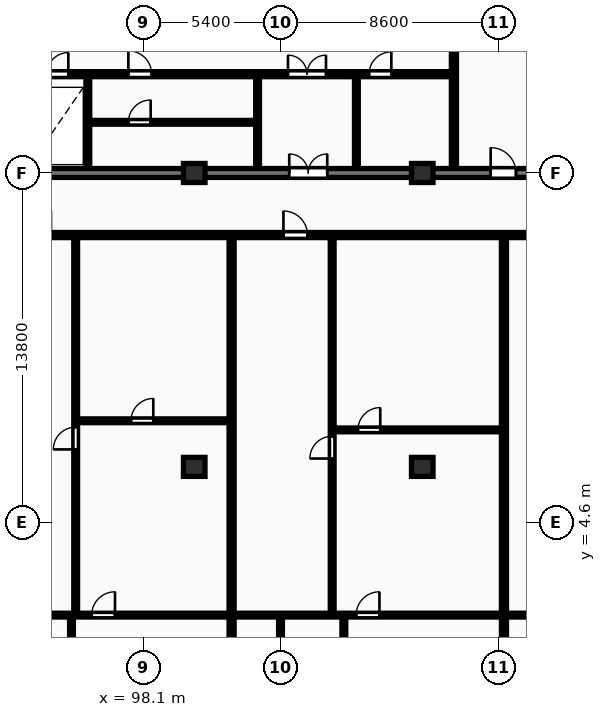
"""IFC4 building model, lengths in metres.
Left out: names, types, materials, properties, quantities, classifications, styles, units other than length and angle.
Written with IfcOpenShell. Run it as: python <this file> out.ifc"""

import sys

from ifc_helpers import new_model, si_unit, direction, frame, frame_2d, origin, origin_2d, place, context, subcontext, project, spatial, rectangle, extrude, element, fill, save


model = new_model("IFC4")
c1 = context("Model", 3, precision=1e-05, world=origin(), true_north=direction((0.0, 1.0)))
c2 = subcontext(c1, "Body", "Model", "MODEL_VIEW")
j1 = project(units=[si_unit("LENGTHUNIT", "METRE"), si_unit("PLANEANGLEUNIT", "RADIAN")], contexts=[c1])
p1 = place(None, origin())
s1 = spatial("IfcSite", under=j1, at=p1, CompositionType="ELEMENT")
p2 = place(p1, origin())
s2 = spatial("IfcBuilding", under=s1, at=p2, CompositionType="ELEMENT")
p3 = place(p2, frame((0.0, 0.0, 100.3)))
s3 = spatial("IfcBuildingStorey", under=s2, at=p3, CompositionType="ELEMENT", Elevation=100.3)
for number, where, z_axis, x_axis in (
    (1, (100.1, 6.8, 0.0), (0.0, 0.0, 1.0), (1.0, 0.0, 0.0)),
    (2, (100.1, 18.4, 0.0), (0.0, 0.0, 1.0), (1.0, 0.0, 0.0)),
    (3, (109.1, 6.8, 0.0), (0.0, 0.0, 1.0), (1.0, 0.0, 0.0)),
    (4, (109.1, 18.4, 0.0), (0.0, 0.0, 1.0), (1.0, 0.0, 0.0)),
):
    element("IfcColumn", number, at=place(p3, frame(where, z_axis=z_axis, x_axis=x_axis)), inside=s3, PredefinedType="COLUMN", context=c2, shape_type="SweptSolid", body=[
        extrude(rectangle(XDim=0.85, YDim=0.75, at=origin_2d()), origin(), (0.0, 0.0, 1.0), 3.25),
    ])
p4 = place(p3, frame((81.925, 18.4, 0.0), z_axis=(0.0, 0.0, 1.0), x_axis=(1.0, 0.0, 0.0)))
e5 = element("IfcWall", 5, at=p4, inside=s3, PredefinedType="SHEAR", context=c2, shape_type="SweptSolid", body=[
    extrude(rectangle(XDim=36.265, YDim=0.35, at=frame_2d((18.132, 0.0))), origin(), (0.0, 0.0, 1.0), 3.25),
])
p5 = place(p4, frame((5.675, 0.0, 0.0)))
e6 = element("IfcOpeningElement", 6, at=p5, cuts=e5, PredefinedType="OPENING", context=c2, shape_type="SweptSolid", body=[
    extrude(rectangle(XDim=1.0, YDim=2.15, at=frame_2d((0.5, 1.075))), frame((0.0, 0.185, 0.0), z_axis=(0.0, -1.0, 0.0), x_axis=(1.0, 0.0, 0.0)), (0.0, 0.0, 1.0), 0.37),
])
p6 = place(p4, frame((21.925, 0.0, 0.0)))
e7 = element("IfcOpeningElement", 7, at=p6, cuts=e5, PredefinedType="OPENING", context=c2, shape_type="SweptSolid", body=[
    extrude(rectangle(XDim=1.5, YDim=2.2, at=frame_2d((0.75, 1.1))), frame((0.0, 0.185, 0.0), z_axis=(0.0, -1.0, 0.0), x_axis=(1.0, 0.0, 0.0)), (0.0, 0.0, 1.0), 0.37),
])
p7 = place(p4, frame((29.875, 0.0, 0.0)))
e8 = element("IfcOpeningElement", 8, at=p7, cuts=e5, PredefinedType="OPENING", context=c2, shape_type="SweptSolid", body=[
    extrude(rectangle(XDim=1.0, YDim=2.15, at=frame_2d((0.5, 1.075))), frame((0.0, 0.185, 0.0), z_axis=(0.0, -1.0, 0.0), x_axis=(1.0, 0.0, 0.0)), (0.0, 0.0, 1.0), 0.37),
])
p8 = place(p3, frame((95.9, 18.6, 0.0), z_axis=(0.0, 0.0, 1.0), x_axis=(0.0, 1.0, 0.0)))
e9 = element("IfcWall", 9, at=p8, inside=s3, PredefinedType="PARTITIONING", context=c2, shape_type="SweptSolid", body=[
    extrude(rectangle(XDim=3.6, YDim=0.15, at=frame_2d((1.8, 0.0))), origin(), (0.0, 0.0, 1.0), 2.97),
])
p9 = place(p3, frame((95.9, 20.4, 0.0), z_axis=(0.0, 0.0, 1.0), x_axis=(1.0, 0.0, 0.0)))
e10 = element("IfcWall", 10, at=p9, inside=s3, PredefinedType="PARTITIONING", context=c2, shape_type="SweptSolid", body=[
    extrude(rectangle(XDim=6.7, YDim=0.15, at=frame_2d((3.35, 0.0))), origin(), (0.0, 0.0, 1.0), 2.97),
])
p10 = place(p9, frame((1.6, 0.0, 0.0)))
e11 = element("IfcOpeningElement", 11, at=p10, cuts=e10, PredefinedType="OPENING", context=c2, shape_type="SweptSolid", body=[
    extrude(rectangle(XDim=0.88, YDim=2.06, at=frame_2d((0.44, 1.03))), frame((0.0, 0.085, 0.0), z_axis=(0.0, -1.0, 0.0), x_axis=(1.0, 0.0, 0.0)), (0.0, 0.0, 1.0), 0.17),
])
for number, where, z_axis, x_axis in (
    (12, (102.6, 18.6, 0.0), (0.0, 0.0, 1.0), (0.0, 1.0, 0.0)),
    (13, (106.5, 18.6, 0.0), (0.0, 0.0, 1.0), (0.0, 1.0, 0.0)),
):
    element("IfcWall", number, at=place(p3, frame(where, z_axis=z_axis, x_axis=x_axis)), inside=s3, PredefinedType="PARTITIONING", context=c2, shape_type="SweptSolid", body=[
        extrude(rectangle(XDim=3.6, YDim=0.15, at=frame_2d((1.8, 0.0))), origin(), (0.0, 0.0, 1.0), 2.97),
    ])
p11 = place(p3, frame((91.08, 22.3, 0.0), z_axis=(0.0, 0.0, 1.0), x_axis=(1.0, 0.0, 0.0)))
e14 = element("IfcWall", 14, at=p11, inside=s3, PredefinedType="PARTITIONING", context=c2, shape_type="SweptSolid", body=[
    extrude(rectangle(XDim=19.14, YDim=0.2, at=frame_2d((9.57, 0.0))), origin(), (0.0, 0.0, 1.0), 2.97),
])
p12 = place(p11, frame((1.15, 0.0, 0.0)))
e15 = element("IfcOpeningElement", 15, at=p12, cuts=e14, PredefinedType="OPENING", context=c2, shape_type="SweptSolid", body=[
    extrude(rectangle(XDim=0.85, YDim=2.05, at=frame_2d((0.425, 1.025))), frame((0.0, 0.11, 0.0), z_axis=(0.0, -1.0, 0.0), x_axis=(1.0, 0.0, 0.0)), (0.0, 0.0, 1.0), 0.22),
])
p13 = place(p11, frame((3.2, 0.0, 0.0)))
e16 = element("IfcOpeningElement", 16, at=p13, cuts=e14, PredefinedType="OPENING", context=c2, shape_type="SweptSolid", body=[
    extrude(rectangle(XDim=0.85, YDim=2.05, at=frame_2d((0.425, 1.025))), frame((0.0, 0.11, 0.0), z_axis=(0.0, -1.0, 0.0), x_axis=(1.0, 0.0, 0.0)), (0.0, 0.0, 1.0), 0.22),
])
p14 = place(p11, frame((12.72, 0.0, 0.0)))
e17 = element("IfcOpeningElement", 17, at=p14, cuts=e14, PredefinedType="OPENING", context=c2, shape_type="SweptSolid", body=[
    extrude(rectangle(XDim=1.5, YDim=2.2, at=frame_2d((0.75, 1.1))), frame((0.0, 0.11, 0.0), z_axis=(0.0, -1.0, 0.0), x_axis=(1.0, 0.0, 0.0)), (0.0, 0.0, 1.0), 0.22),
])
p15 = place(p11, frame((6.42, 0.0, 0.0)))
e18 = element("IfcOpeningElement", 18, at=p15, cuts=e14, PredefinedType="OPENING", context=c2, shape_type="SweptSolid", body=[
    extrude(rectangle(XDim=0.92, YDim=2.08, at=frame_2d((0.46, 1.04))), frame((0.0, 0.11, 0.0), z_axis=(0.0, -1.0, 0.0), x_axis=(1.0, 0.0, 0.0)), (0.0, 0.0, 1.0), 0.22),
])
p16 = place(p11, frame((15.92, 0.0, 0.0)))
e19 = element("IfcOpeningElement", 19, at=p16, cuts=e14, PredefinedType="OPENING", context=c2, shape_type="SweptSolid", body=[
    extrude(rectangle(XDim=0.88, YDim=2.06, at=frame_2d((0.44, 1.03))), frame((0.0, 0.11, 0.0), z_axis=(0.0, -1.0, 0.0), x_axis=(1.0, 0.0, 0.0)), (0.0, 0.0, 1.0), 0.22),
])
p17 = place(p3, frame((110.35, 18.6, 0.0), z_axis=(0.0, 0.0, 1.0), x_axis=(0.0, 1.0, 0.0)))
e20 = element("IfcWall", 20, at=p17, inside=s3, PredefinedType="PARTITIONING", context=c2, shape_type="SweptSolid", body=[
    extrude(rectangle(XDim=11.6, YDim=0.2, at=frame_2d((5.8, 0.0))), origin(), (0.0, 0.0, 1.0), 2.97),
])
p18 = place(p17, frame((5.2, 0.0, 0.0)))
e21 = element("IfcOpeningElement", 21, at=p18, cuts=e20, PredefinedType="OPENING", context=c2, shape_type="SweptSolid", body=[
    extrude(rectangle(XDim=1.1, YDim=2.15, at=frame_2d((0.55, 1.075))), frame((0.0, 0.11, 0.0), z_axis=(0.0, -1.0, 0.0), x_axis=(1.0, 0.0, 0.0)), (0.0, 0.0, 1.0), 0.22),
])
p19 = place(p3, frame((101.575, -8.7, 0.0), z_axis=(0.0, 0.0, 1.0), x_axis=(0.0, 1.0, 0.0)))
e22 = element("IfcWall", 22, at=p19, inside=s3, PredefinedType="PARTITIONING", context=c2, shape_type="SweptSolid", body=[
    extrude(rectangle(XDim=24.57, YDim=0.2, at=frame_2d((12.285, 0.0))), origin(), (0.0, 0.0, 1.0), 2.97),
])
p20 = place(p3, frame((95.48, 8.62, 0.0), z_axis=(0.0, 0.0, 1.0), x_axis=(1.0, 0.0, 0.0)))
e23 = element("IfcWall", 23, at=p20, inside=s3, PredefinedType="PARTITIONING", context=c2, shape_type="SweptSolid", body=[
    extrude(rectangle(XDim=6.015, YDim=0.15, at=frame_2d((3.008, 0.0))), origin(), (0.0, 0.0, 1.0), 2.97),
])
p21 = place(p20, frame((2.124, 0.0, 0.0)))
e24 = element("IfcOpeningElement", 24, at=p21, cuts=e23, PredefinedType="OPENING", context=c2, shape_type="SweptSolid", body=[
    extrude(rectangle(XDim=0.88, YDim=2.06, at=frame_2d((0.44, 1.03))), frame((0.0, 0.085, 0.0), z_axis=(0.0, -1.0, 0.0), x_axis=(1.0, 0.0, 0.0)), (0.0, 0.0, 1.0), 0.17),
])
p22 = place(p3, frame((95.42, 0.99, 0.0), z_axis=(0.0, 0.0, 1.0), x_axis=(0.0, 1.0, 0.0)))
e25 = element("IfcWall", 25, at=p22, inside=s3, PredefinedType="PARTITIONING", context=c2, shape_type="SweptSolid", body=[
    extrude(rectangle(XDim=14.9, YDim=0.15, at=frame_2d((7.45, 0.0))), origin(), (0.0, 0.0, 1.0), 2.97),
])
p23 = place(p22, frame((6.5, 0.0, 0.0)))
e26 = element("IfcOpeningElement", 26, at=p23, cuts=e25, PredefinedType="OPENING", context=c2, shape_type="SweptSolid", body=[
    extrude(rectangle(XDim=0.88, YDim=2.06, at=frame_2d((0.44, 1.03))), frame((0.0, 0.085, 0.0), z_axis=(0.0, -1.0, 0.0), x_axis=(1.0, 0.0, 0.0)), (0.0, 0.0, 1.0), 0.17),
])
p24 = place(p3, frame((95.255, -4.09, 0.0), z_axis=(0.0, 0.0, 1.0), x_axis=(0.0, 1.0, 0.0)))
e27 = element("IfcWall", 27, at=p24, inside=s3, PredefinedType="PARTITIONING", context=c2, shape_type="SweptSolid", body=[
    extrude(rectangle(XDim=5.0, YDim=0.15, at=frame_2d((2.5, 0.0))), origin(), (0.0, 0.0, 1.0), 2.97),
])
p25 = place(p24, frame((2.08, 0.0, 0.0)))
e28 = element("IfcOpeningElement", 28, at=p25, cuts=e27, PredefinedType="OPENING", context=c2, shape_type="SweptSolid", body=[
    extrude(rectangle(XDim=0.84, YDim=2.04, at=frame_2d((0.42, 1.02))), frame((0.0, 0.085, 0.0), z_axis=(0.0, -1.0, 0.0), x_axis=(1.0, 0.0, 0.0)), (0.0, 0.0, 1.0), 0.17),
])
p26 = place(p3, frame((91.53, 0.95, 0.0), z_axis=(0.0, 0.0, 1.0), x_axis=(1.0, 0.0, 0.0)))
e29 = element("IfcWall", 29, at=p26, inside=s3, PredefinedType="PARTITIONING", context=c2, shape_type="SweptSolid", body=[
    extrude(rectangle(XDim=9.965, YDim=0.15, at=frame_2d((4.982, 0.0))), origin(), (0.0, 0.0, 1.0), 2.97),
])
p27 = place(p26, frame((4.522, 0.0, 0.0)))
e30 = element("IfcOpeningElement", 30, at=p27, cuts=e29, PredefinedType="OPENING", context=c2, shape_type="SweptSolid", body=[
    extrude(rectangle(XDim=0.92, YDim=2.08, at=frame_2d((0.46, 1.04))), frame((0.0, 0.085, 0.0), z_axis=(0.0, -1.0, 0.0), x_axis=(1.0, 0.0, 0.0)), (0.0, 0.0, 1.0), 0.17),
])
p28 = place(p3, frame((112.325, -8.7, 0.0), z_axis=(0.0, 0.0, 1.0), x_axis=(0.0, 1.0, 0.0)))
e31 = element("IfcWall", 31, at=p28, inside=s3, PredefinedType="PARTITIONING", context=c2, shape_type="SweptSolid", body=[
    extrude(rectangle(XDim=24.57, YDim=0.2, at=frame_2d((12.285, 0.0))), origin(), (0.0, 0.0, 1.0), 2.97),
])
p29 = place(p3, frame((105.605, 8.26, 0.0), z_axis=(0.0, 0.0, 1.0), x_axis=(1.0, 0.0, 0.0)))
e32 = element("IfcWall", 32, at=p29, inside=s3, PredefinedType="PARTITIONING", context=c2, shape_type="SweptSolid", body=[
    extrude(rectangle(XDim=6.64, YDim=0.15, at=frame_2d((3.32, 0.0))), origin(), (0.0, 0.0, 1.0), 2.97),
])
p30 = place(p29, frame((0.957, 0.0, 0.0)))
e33 = element("IfcOpeningElement", 33, at=p30, cuts=e32, PredefinedType="OPENING", context=c2, shape_type="SweptSolid", body=[
    extrude(rectangle(XDim=0.88, YDim=2.06, at=frame_2d((0.44, 1.03))), frame((0.0, 0.085, 0.0), z_axis=(0.0, -1.0, 0.0), x_axis=(1.0, 0.0, 0.0)), (0.0, 0.0, 1.0), 0.17),
])
p31 = place(p3, frame((105.545, 0.99, 0.0), z_axis=(0.0, 0.0, 1.0), x_axis=(0.0, 1.0, 0.0)))
e34 = element("IfcWall", 34, at=p31, inside=s3, PredefinedType="PARTITIONING", context=c2, shape_type="SweptSolid", body=[
    extrude(rectangle(XDim=14.9, YDim=0.15, at=frame_2d((7.45, 0.0))), origin(), (0.0, 0.0, 1.0), 2.97),
])
p32 = place(p31, frame((6.14, 0.0, 0.0)))
e35 = element("IfcOpeningElement", 35, at=p32, cuts=e34, PredefinedType="OPENING", context=c2, shape_type="SweptSolid", body=[
    extrude(rectangle(XDim=0.88, YDim=2.06, at=frame_2d((0.44, 1.03))), frame((0.0, 0.085, 0.0), z_axis=(0.0, -1.0, 0.0), x_axis=(1.0, 0.0, 0.0)), (0.0, 0.0, 1.0), 0.17),
])
p33 = place(p3, frame((103.505, -4.09, 0.0), z_axis=(0.0, 0.0, 1.0), x_axis=(0.0, 1.0, 0.0)))
e36 = element("IfcWall", 36, at=p33, inside=s3, PredefinedType="PARTITIONING", context=c2, shape_type="SweptSolid", body=[
    extrude(rectangle(XDim=5.0, YDim=0.15, at=frame_2d((2.5, 0.0))), origin(), (0.0, 0.0, 1.0), 2.97),
])
p34 = place(p33, frame((2.08, 0.0, 0.0)))
e37 = element("IfcOpeningElement", 37, at=p34, cuts=e36, PredefinedType="OPENING", context=c2, shape_type="SweptSolid", body=[
    extrude(rectangle(XDim=0.84, YDim=2.04, at=frame_2d((0.42, 1.02))), frame((0.0, 0.085, 0.0), z_axis=(0.0, -1.0, 0.0), x_axis=(1.0, 0.0, 0.0)), (0.0, 0.0, 1.0), 0.17),
])
p35 = place(p3, frame((106.005, -4.09, 0.0), z_axis=(0.0, 0.0, 1.0), x_axis=(0.0, 1.0, 0.0)))
e38 = element("IfcWall", 38, at=p35, inside=s3, PredefinedType="PARTITIONING", context=c2, shape_type="SweptSolid", body=[
    extrude(rectangle(XDim=5.0, YDim=0.15, at=frame_2d((2.5, 0.0))), origin(), (0.0, 0.0, 1.0), 2.97),
])
p36 = place(p35, frame((2.08, 0.0, 0.0)))
e39 = element("IfcOpeningElement", 39, at=p36, cuts=e38, PredefinedType="OPENING", context=c2, shape_type="SweptSolid", body=[
    extrude(rectangle(XDim=0.84, YDim=2.04, at=frame_2d((0.42, 1.02))), frame((0.0, 0.085, 0.0), z_axis=(0.0, -1.0, 0.0), x_axis=(1.0, 0.0, 0.0)), (0.0, 0.0, 1.0), 0.17),
])
p37 = place(p3, frame((101.655, 0.95, 0.0), z_axis=(0.0, 0.0, 1.0), x_axis=(1.0, 0.0, 0.0)))
e40 = element("IfcWall", 40, at=p37, inside=s3, PredefinedType="PARTITIONING", context=c2, shape_type="SweptSolid", body=[
    extrude(rectangle(XDim=10.59, YDim=0.15, at=frame_2d((5.295, 0.0))), origin(), (0.0, 0.0, 1.0), 2.97),
])
p38 = place(p37, frame((4.835, 0.0, 0.0)))
e41 = element("IfcOpeningElement", 41, at=p38, cuts=e40, PredefinedType="OPENING", context=c2, shape_type="SweptSolid", body=[
    extrude(rectangle(XDim=0.92, YDim=2.08, at=frame_2d((0.46, 1.04))), frame((0.0, 0.085, 0.0), z_axis=(0.0, -1.0, 0.0), x_axis=(1.0, 0.0, 0.0)), (0.0, 0.0, 1.0), 0.17),
])
p39 = place(p3, frame((112.405, 0.95, 0.0), z_axis=(0.0, 0.0, 1.0), x_axis=(1.0, 0.0, 0.0)))
e42 = element("IfcWall", 42, at=p39, inside=s3, PredefinedType="PARTITIONING", context=c2, shape_type="SweptSolid", body=[
    extrude(rectangle(XDim=18.215, YDim=0.15, at=frame_2d((9.107, 0.0))), origin(), (0.0, 0.0, 1.0), 2.97),
])
p40 = place(p39, frame((2.72, 0.0, 0.0)))
e43 = element("IfcOpeningElement", 43, at=p40, cuts=e42, PredefinedType="OPENING", context=c2, shape_type="SweptSolid", body=[
    extrude(rectangle(XDim=0.92, YDim=2.08, at=frame_2d((0.46, 1.04))), frame((0.0, 0.085, 0.0), z_axis=(0.0, -1.0, 0.0), x_axis=(1.0, 0.0, 0.0)), (0.0, 0.0, 1.0), 0.17),
])
p41 = place(p3, frame((72.7, 15.95, 0.0), z_axis=(0.0, 0.0, 1.0), x_axis=(1.0, 0.0, 0.0)))
e44 = element("IfcWall", 44, at=p41, inside=s3, PredefinedType="PARTITIONING", context=c2, shape_type="SweptSolid", body=[
    extrude(rectangle(XDim=58.0, YDim=0.2, at=frame_2d((29.0, 0.0))), origin(), (0.0, 0.0, 1.0), 2.97),
])
p42 = place(p41, frame((6.539, 0.0, 0.0)))
e45 = element("IfcOpeningElement", 45, at=p42, cuts=e44, PredefinedType="OPENING", context=c2, shape_type="SweptSolid", body=[
    extrude(rectangle(XDim=1.22, YDim=2.18, at=frame_2d((0.61, 1.09))), frame((0.0, 0.11, 0.0), z_axis=(0.0, -1.0, 0.0), x_axis=(1.0, 0.0, 0.0)), (0.0, 0.0, 1.0), 0.22),
])
p43 = place(p41, frame((20.795, 0.0, 0.0)))
e46 = element("IfcOpeningElement", 46, at=p43, cuts=e44, PredefinedType="OPENING", context=c2, shape_type="SweptSolid", body=[
    extrude(rectangle(XDim=0.95, YDim=2.15, at=frame_2d((0.475, 1.075))), frame((0.0, 0.11, 0.0), z_axis=(0.0, -1.0, 0.0), x_axis=(1.0, 0.0, 0.0)), (0.0, 0.0, 1.0), 0.22),
])
p44 = place(p41, frame((30.92, 0.0, 0.0)))
e47 = element("IfcOpeningElement", 47, at=p44, cuts=e44, PredefinedType="OPENING", context=c2, shape_type="SweptSolid", body=[
    extrude(rectangle(XDim=0.95, YDim=2.15, at=frame_2d((0.475, 1.075))), frame((0.0, 0.11, 0.0), z_axis=(0.0, -1.0, 0.0), x_axis=(1.0, 0.0, 0.0)), (0.0, 0.0, 1.0), 0.22),
])
p45 = place(p41, frame((41.67, 0.0, 0.0)))
e48 = element("IfcOpeningElement", 48, at=p45, cuts=e44, PredefinedType="OPENING", context=c2, shape_type="SweptSolid", body=[
    extrude(rectangle(XDim=0.95, YDim=2.15, at=frame_2d((0.475, 1.075))), frame((0.0, 0.11, 0.0), z_axis=(0.0, -1.0, 0.0), x_axis=(1.0, 0.0, 0.0)), (0.0, 0.0, 1.0), 0.22),
])
p46 = place(p6, origin())
e49 = element("IfcDoor", 49, at=p46, inside=s3, OperationType="DOUBLE_DOOR_SINGLE_SWING", PredefinedType="DOOR", context=c2, shape_type="SweptSolid", body=[
    extrude(rectangle(XDim=1.5, YDim=2.2, at=frame_2d((0.75, 1.1))), frame((0.0, 0.025, 0.0), z_axis=(0.0, -1.0, 0.0), x_axis=(1.0, 0.0, 0.0)), (0.0, 0.0, 1.0), 0.05),
])
fill(e7, e49)
p47 = place(p7, origin())
e50 = element("IfcDoor", 50, at=p47, inside=s3, OperationType="SINGLE_SWING_LEFT", PredefinedType="DOOR", context=c2, shape_type="SweptSolid", body=[
    extrude(rectangle(XDim=1.0, YDim=2.15, at=frame_2d((0.5, 1.075))), frame((0.0, 0.025, 0.0), z_axis=(0.0, -1.0, 0.0), x_axis=(1.0, 0.0, 0.0)), (0.0, 0.0, 1.0), 0.05),
])
fill(e8, e50)
p48 = place(p10, origin())
e51 = element("IfcDoor", 51, at=p48, inside=s3, OperationType="SINGLE_SWING_RIGHT", PredefinedType="DOOR", context=c2, shape_type="SweptSolid", body=[
    extrude(rectangle(XDim=0.88, YDim=2.06, at=frame_2d((0.44, 1.03))), frame((0.0, 0.025, 0.0), z_axis=(0.0, -1.0, 0.0), x_axis=(1.0, 0.0, 0.0)), (0.0, 0.0, 1.0), 0.05),
])
fill(e11, e51)
p49 = place(p13, origin())
e52 = element("IfcDoor", 52, at=p49, inside=s3, OperationType="SINGLE_SWING_RIGHT", PredefinedType="DOOR", context=c2, shape_type="SweptSolid", body=[
    extrude(rectangle(XDim=0.85, YDim=2.05, at=frame_2d((0.425, 1.025))), frame((0.0, 0.025, 0.0), z_axis=(0.0, -1.0, 0.0), x_axis=(1.0, 0.0, 0.0)), (0.0, 0.0, 1.0), 0.05),
])
fill(e16, e52)
p50 = place(p14, origin())
e53 = element("IfcDoor", 53, at=p50, inside=s3, OperationType="DOUBLE_DOOR_SINGLE_SWING", PredefinedType="DOOR", context=c2, shape_type="SweptSolid", body=[
    extrude(rectangle(XDim=1.5, YDim=2.2, at=frame_2d((0.75, 1.1))), frame((0.0, 0.025, 0.0), z_axis=(0.0, -1.0, 0.0), x_axis=(1.0, 0.0, 0.0)), (0.0, 0.0, 1.0), 0.05),
])
fill(e17, e53)
p51 = place(p15, origin())
e54 = element("IfcDoor", 54, at=p51, inside=s3, OperationType="SINGLE_SWING_LEFT", PredefinedType="DOOR", context=c2, shape_type="SweptSolid", body=[
    extrude(rectangle(XDim=0.92, YDim=2.08, at=frame_2d((0.46, 1.04))), frame((0.0, 0.025, 0.0), z_axis=(0.0, -1.0, 0.0), x_axis=(1.0, 0.0, 0.0)), (0.0, 0.0, 1.0), 0.05),
])
fill(e18, e54)
p52 = place(p16, origin())
e55 = element("IfcDoor", 55, at=p52, inside=s3, OperationType="SINGLE_SWING_RIGHT", PredefinedType="DOOR", context=c2, shape_type="SweptSolid", body=[
    extrude(rectangle(XDim=0.88, YDim=2.06, at=frame_2d((0.44, 1.03))), frame((0.0, 0.025, 0.0), z_axis=(0.0, -1.0, 0.0), x_axis=(1.0, 0.0, 0.0)), (0.0, 0.0, 1.0), 0.05),
])
fill(e19, e55)
p53 = place(p21, origin())
e56 = element("IfcDoor", 56, at=p53, inside=s3, OperationType="SINGLE_SWING_RIGHT", PredefinedType="DOOR", context=c2, shape_type="SweptSolid", body=[
    extrude(rectangle(XDim=0.88, YDim=2.06, at=frame_2d((0.44, 1.03))), frame((0.0, 0.025, 0.0), z_axis=(0.0, -1.0, 0.0), x_axis=(1.0, 0.0, 0.0)), (0.0, 0.0, 1.0), 0.05),
])
fill(e24, e56)
p54 = place(p23, origin())
e57 = element("IfcDoor", 57, at=p54, inside=s3, OperationType="SINGLE_SWING_LEFT", PredefinedType="DOOR", context=c2, shape_type="SweptSolid", body=[
    extrude(rectangle(XDim=0.88, YDim=2.06, at=frame_2d((0.44, 1.03))), frame((0.0, 0.025, 0.0), z_axis=(0.0, -1.0, 0.0), x_axis=(1.0, 0.0, 0.0)), (0.0, 0.0, 1.0), 0.05),
])
fill(e26, e57)
p55 = place(p27, origin())
e58 = element("IfcDoor", 58, at=p55, inside=s3, OperationType="SINGLE_SWING_RIGHT", PredefinedType="DOOR", context=c2, shape_type="SweptSolid", body=[
    extrude(rectangle(XDim=0.92, YDim=2.08, at=frame_2d((0.46, 1.04))), frame((0.0, 0.025, 0.0), z_axis=(0.0, -1.0, 0.0), x_axis=(1.0, 0.0, 0.0)), (0.0, 0.0, 1.0), 0.05),
])
fill(e30, e58)
p56 = place(p30, origin())
e59 = element("IfcDoor", 59, at=p56, inside=s3, OperationType="SINGLE_SWING_RIGHT", PredefinedType="DOOR", context=c2, shape_type="SweptSolid", body=[
    extrude(rectangle(XDim=0.88, YDim=2.06, at=frame_2d((0.44, 1.03))), frame((0.0, 0.025, 0.0), z_axis=(0.0, -1.0, 0.0), x_axis=(1.0, 0.0, 0.0)), (0.0, 0.0, 1.0), 0.05),
])
fill(e33, e59)
p57 = place(p32, origin())
e60 = element("IfcDoor", 60, at=p57, inside=s3, OperationType="SINGLE_SWING_LEFT", PredefinedType="DOOR", context=c2, shape_type="SweptSolid", body=[
    extrude(rectangle(XDim=0.88, YDim=2.06, at=frame_2d((0.44, 1.03))), frame((0.0, 0.025, 0.0), z_axis=(0.0, -1.0, 0.0), x_axis=(1.0, 0.0, 0.0)), (0.0, 0.0, 1.0), 0.05),
])
fill(e35, e60)
p58 = place(p38, origin())
e61 = element("IfcDoor", 61, at=p58, inside=s3, OperationType="SINGLE_SWING_RIGHT", PredefinedType="DOOR", context=c2, shape_type="SweptSolid", body=[
    extrude(rectangle(XDim=0.92, YDim=2.08, at=frame_2d((0.46, 1.04))), frame((0.0, 0.025, 0.0), z_axis=(0.0, -1.0, 0.0), x_axis=(1.0, 0.0, 0.0)), (0.0, 0.0, 1.0), 0.05),
])
fill(e41, e61)
p59 = place(p44, origin())
e62 = element("IfcDoor", 62, at=p59, inside=s3, OperationType="SINGLE_SWING_LEFT", PredefinedType="DOOR", context=c2, shape_type="SweptSolid", body=[
    extrude(rectangle(XDim=0.95, YDim=2.15, at=frame_2d((0.475, 1.075))), frame((0.0, 0.025, 0.0), z_axis=(0.0, -1.0, 0.0), x_axis=(1.0, 0.0, 0.0)), (0.0, 0.0, 1.0), 0.05),
])
fill(e47, e62)
save(model, sys.argv[1])
